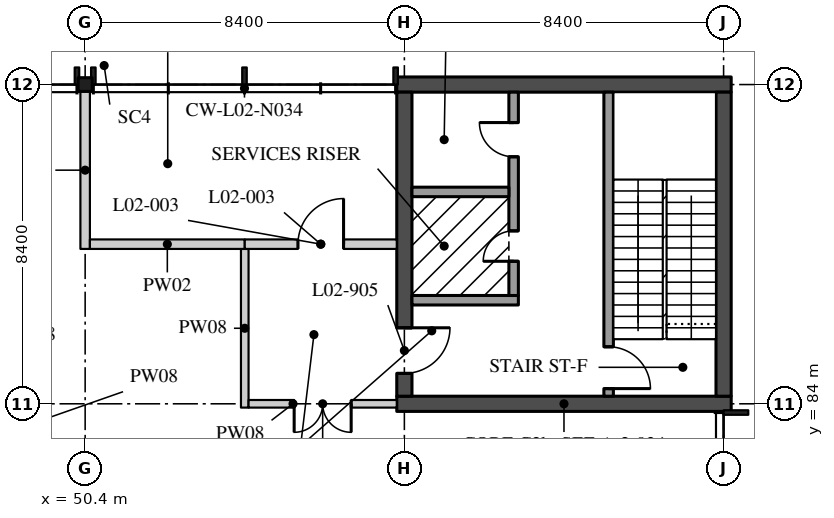
"""IFC4 building model, lengths in metres.
Left out: names, types, materials, properties, quantities, classifications, styles, units other than length and angle.
Written with IfcOpenShell. Run it as: python <this file> out.ifc"""

import sys

from ifc_helpers import new_model, si_unit, direction, frame, frame_2d, origin, origin_2d, place, context, subcontext, project, spatial, rectangle, i_section, extrude, element, fill, save


model = new_model("IFC4")
c1 = context("Model", 3, precision=1e-05, world=origin(), true_north=direction((0.0, 1.0)))
c2 = subcontext(c1, "Body", "Model", "MODEL_VIEW")
j1 = project(units=[si_unit("LENGTHUNIT", "METRE"), si_unit("PLANEANGLEUNIT", "RADIAN")], contexts=[c1])
p1 = place(None, origin())
s1 = spatial("IfcSite", under=j1, at=p1, CompositionType="ELEMENT")
p2 = place(p1, origin())
s2 = spatial("IfcBuilding", under=s1, at=p2, CompositionType="ELEMENT")
p3 = place(p2, frame((0.0, 0.0, 9.9)))
s3 = spatial("IfcBuildingStorey", under=s2, at=p3, CompositionType="ELEMENT", Elevation=9.9)
p4 = place(p3, frame((50.4, 92.4, 0.0), z_axis=(0.0, 0.0, 1.0), x_axis=(1.0, 0.0, 0.0)))
e1 = element("IfcColumn", 1, at=p4, inside=s3, PredefinedType="COLUMN", context=c2, shape_type="SweptSolid", body=[
    extrude(i_section(OverallWidth=0.371, OverallDepth=0.361, WebThickness=0.012, FlangeThickness=0.02, FilletRadius=0.015, at=origin_2d()), origin(), (0.0, 0.0, 1.0), 4.5),
])
for number, where, z_axis, x_axis in (
    (2, (58.6, 84.0, 0.0), (0.0, 0.0, 1.0), (1.0, 0.0, 0.0)),
    (3, (58.6, 92.4, 0.0), (0.0, 0.0, 1.0), (1.0, 0.0, 0.0)),
):
    element("IfcWall", number, at=place(p3, frame(where, z_axis=z_axis, x_axis=x_axis)), inside=s3, PredefinedType="SHEAR", context=c2, shape_type="SweptSolid", body=[
        extrude(rectangle(XDim=8.8, YDim=0.4, at=frame_2d((4.4, 0.0))), origin(), (0.0, 0.0, 1.0), 4.25),
    ])
p5 = place(p3, frame((58.8, 84.2, 0.0), z_axis=(0.0, 0.0, 1.0), x_axis=(0.0, 1.0, 0.0)))
e4 = element("IfcWall", 4, at=p5, inside=s3, PredefinedType="SHEAR", context=c2, shape_type="SweptSolid", body=[
    extrude(rectangle(XDim=8.0, YDim=0.4, at=frame_2d((4.0, 0.0))), origin(), (0.0, 0.0, 1.0), 4.25),
])
p6 = place(p5, frame((0.6, 0.0, 0.0)))
e5 = element("IfcOpeningElement", 5, at=p6, cuts=e4, PredefinedType="OPENING", context=c2, shape_type="SweptSolid", body=[
    extrude(rectangle(XDim=1.2, YDim=2.1, at=frame_2d((0.6, 1.05))), frame((0.0, 0.21, 0.0), z_axis=(0.0, -1.0, 0.0), x_axis=(1.0, 0.0, 0.0)), (0.0, 0.0, 1.0), 0.42),
])
p7 = place(p3, frame((67.2, 84.2, 0.0), z_axis=(0.0, 0.0, 1.0), x_axis=(0.0, 1.0, 0.0)))
e6 = element("IfcWall", 6, at=p7, inside=s3, PredefinedType="SHEAR", context=c2, shape_type="SweptSolid", body=[
    extrude(rectangle(XDim=8.0, YDim=0.4, at=frame_2d((4.0, 0.0))), origin(), (0.0, 0.0, 1.0), 4.25),
])
p8 = place(p3, frame((64.175, 84.2, 0.0), z_axis=(0.0, 0.0, 1.0), x_axis=(0.0, 1.0, 0.0)))
e7 = element("IfcWall", 7, at=p8, inside=s3, PredefinedType="SOLIDWALL", context=c2, shape_type="SweptSolid", body=[
    extrude(rectangle(XDim=8.0, YDim=0.25, at=frame_2d((4.0, 0.0))), origin(), (0.0, 0.0, 1.0), 4.25),
])
p9 = place(p8, frame((0.2, 0.0, 0.0)))
e8 = element("IfcOpeningElement", 8, at=p9, cuts=e7, PredefinedType="OPENING", context=c2, shape_type="SweptSolid", body=[
    extrude(rectangle(XDim=1.1, YDim=2.1, at=frame_2d((0.55, 1.05))), frame((0.0, 0.135, 0.0), z_axis=(0.0, -1.0, 0.0), x_axis=(1.0, 0.0, 0.0)), (0.0, 0.0, 1.0), 0.27),
])
p10 = place(p3, frame((61.8, 86.725, 0.0), z_axis=(0.0, 0.0, 1.0), x_axis=(-1.0, 0.0, 0.0)))
e9 = element("IfcWall", 9, at=p10, inside=s3, PredefinedType="SOLIDWALL", context=c2, shape_type="SweptSolid", body=[
    extrude(rectangle(XDim=2.8, YDim=0.25, at=frame_2d((1.4, 0.0))), origin(), (0.0, 0.0, 1.0), 4.25),
])
p11 = place(p3, frame((61.675, 86.85, 0.0), z_axis=(0.0, 0.0, 1.0), x_axis=(0.0, 1.0, 0.0)))
e10 = element("IfcWall", 10, at=p11, inside=s3, PredefinedType="SOLIDWALL", context=c2, shape_type="SweptSolid", body=[
    extrude(rectangle(XDim=5.35, YDim=0.25, at=frame_2d((2.675, 0.0))), origin(), (0.0, 0.0, 1.0), 4.25),
])
p12 = place(p11, frame((3.65, 0.0, 0.0)))
e11 = element("IfcOpeningElement", 11, at=p12, cuts=e10, PredefinedType="OPENING", context=c2, shape_type="SweptSolid", body=[
    extrude(rectangle(XDim=0.9, YDim=2.1, at=frame_2d((0.45, 1.05))), frame((0.0, 0.135, 0.0), z_axis=(0.0, -1.0, 0.0), x_axis=(1.0, 0.0, 0.0)), (0.0, 0.0, 1.0), 0.27),
])
p13 = place(p11, frame((0.9, 0.0, 0.0)))
e12 = element("IfcOpeningElement", 12, at=p13, cuts=e10, PredefinedType="OPENING", context=c2, shape_type="SweptSolid", body=[
    extrude(rectangle(XDim=0.8, YDim=2.1, at=frame_2d((0.4, 1.05))), frame((0.0, 0.135, 0.0), z_axis=(0.0, -1.0, 0.0), x_axis=(1.0, 0.0, 0.0)), (0.0, 0.0, 1.0), 0.27),
])
p14 = place(p3, frame((61.55, 89.575, 0.0), z_axis=(0.0, 0.0, 1.0), x_axis=(-1.0, 0.0, 0.0)))
e13 = element("IfcWall", 13, at=p14, inside=s3, PredefinedType="SOLIDWALL", context=c2, shape_type="SweptSolid", body=[
    extrude(rectangle(XDim=2.55, YDim=0.25, at=frame_2d((1.275, 0.0))), origin(), (0.0, 0.0, 1.0), 4.25),
])
p15 = place(p3, frame((54.6, 83.9, 0.0), z_axis=(0.0, 0.0, 1.0), x_axis=(0.0, 1.0, 0.0)))
e14 = element("IfcWall", 14, at=p15, inside=s3, PredefinedType="PARTITIONING", context=c2, shape_type="SweptSolid", body=[
    extrude(rectangle(XDim=4.175, YDim=0.2, at=frame_2d((2.087, 0.0))), origin(), (0.0, 0.0, 1.0), 4.25),
])
p16 = place(p3, frame((54.7, 84.0, 0.0), z_axis=(0.0, 0.0, 1.0), x_axis=(1.0, 0.0, 0.0)))
e15 = element("IfcWall", 15, at=p16, inside=s3, PredefinedType="PARTITIONING", context=c2, shape_type="SweptSolid", body=[
    extrude(rectangle(XDim=3.9, YDim=0.2, at=frame_2d((1.95, 0.0))), origin(), (0.0, 0.0, 1.0), 4.25),
])
p17 = place(p16, frame((1.2, 0.0, 0.0)))
e16 = element("IfcOpeningElement", 16, at=p17, cuts=e15, PredefinedType="OPENING", context=c2, shape_type="SweptSolid", body=[
    extrude(rectangle(XDim=1.5, YDim=2.1, at=frame_2d((0.75, 1.05))), frame((0.0, 0.11, 0.0), z_axis=(0.0, -1.0, 0.0), x_axis=(1.0, 0.0, 0.0)), (0.0, 0.0, 1.0), 0.22),
])
p18 = place(p3, frame((50.4, 88.075, 0.0), z_axis=(0.0, 0.0, 1.0), x_axis=(0.0, 1.0, 0.0)))
e17 = element("IfcWall", 17, at=p18, inside=s3, PredefinedType="PARTITIONING", context=c2, shape_type="SweptSolid", body=[
    extrude(rectangle(XDim=4.145, YDim=0.25, at=frame_2d((2.073, 0.0))), origin(), (0.0, 0.0, 1.0), 4.25),
])
p19 = place(p3, frame((50.525, 88.2, 0.0), z_axis=(0.0, 0.0, 1.0), x_axis=(1.0, 0.0, 0.0)))
e18 = element("IfcWall", 18, at=p19, inside=s3, PredefinedType="PARTITIONING", context=c2, shape_type="SweptSolid", body=[
    extrude(rectangle(XDim=4.075, YDim=0.25, at=frame_2d((2.038, 0.0))), origin(), (0.0, 0.0, 1.0), 4.25),
])
p20 = place(p3, frame((54.6, 88.2, 0.0), z_axis=(0.0, 0.0, 1.0), x_axis=(1.0, 0.0, 0.0)))
e19 = element("IfcWall", 19, at=p20, inside=s3, PredefinedType="PARTITIONING", context=c2, shape_type="SweptSolid", body=[
    extrude(rectangle(XDim=4.0, YDim=0.25, at=frame_2d((2.0, 0.0))), origin(), (0.0, 0.0, 1.0), 4.25),
])
p21 = place(p20, frame((1.4, 0.0, 0.0)))
e20 = element("IfcOpeningElement", 20, at=p21, cuts=e19, PredefinedType="OPENING", context=c2, shape_type="SweptSolid", body=[
    extrude(rectangle(XDim=1.2, YDim=2.4, at=frame_2d((0.6, 1.2))), frame((0.0, 0.135, 0.0), z_axis=(0.0, -1.0, 0.0), x_axis=(1.0, 0.0, 0.0)), (0.0, 0.0, 1.0), 0.27),
])
p22 = place(p12, origin())
e21 = element("IfcDoor", 21, at=p22, inside=s3, OperationType="SINGLE_SWING_LEFT", PredefinedType="DOOR", context=c2, shape_type="SweptSolid", body=[
    extrude(rectangle(XDim=0.9, YDim=2.1, at=frame_2d((0.45, 1.05))), frame((0.0, 0.035, 0.0), z_axis=(0.0, -1.0, 0.0), x_axis=(1.0, 0.0, 0.0)), (0.0, 0.0, 1.0), 0.07),
])
fill(e11, e21)
p23 = place(p6, frame((1.2, 0.0, 0.0), z_axis=(0.0, 0.0, 1.0), x_axis=(-1.0, 0.0, 0.0)))
e22 = element("IfcDoor", 22, at=p23, inside=s3, OperationType="SINGLE_SWING_RIGHT", PredefinedType="DOOR", context=c2, shape_type="SweptSolid", body=[
    extrude(rectangle(XDim=1.2, YDim=2.1, at=frame_2d((0.6, 1.05))), frame((0.0, 0.035, 0.0), z_axis=(0.0, -1.0, 0.0), x_axis=(1.0, 0.0, 0.0)), (0.0, 0.0, 1.0), 0.07),
])
fill(e5, e22)
p24 = place(p13, origin())
e23 = element("IfcDoor", 23, at=p24, inside=s3, OperationType="SINGLE_SWING_RIGHT", PredefinedType="DOOR", context=c2, shape_type="SweptSolid", body=[
    extrude(rectangle(XDim=0.8, YDim=2.1, at=frame_2d((0.4, 1.05))), frame((0.0, 0.035, 0.0), z_axis=(0.0, -1.0, 0.0), x_axis=(1.0, 0.0, 0.0)), (0.0, 0.0, 1.0), 0.07),
])
fill(e12, e23)
p25 = place(p9, frame((1.1, 0.0, 0.0), z_axis=(0.0, 0.0, 1.0), x_axis=(-1.0, 0.0, 0.0)))
e24 = element("IfcDoor", 24, at=p25, inside=s3, OperationType="SINGLE_SWING_LEFT", PredefinedType="DOOR", context=c2, shape_type="SweptSolid", body=[
    extrude(rectangle(XDim=1.1, YDim=2.1, at=frame_2d((0.55, 1.05))), frame((0.0, 0.035, 0.0), z_axis=(0.0, -1.0, 0.0), x_axis=(1.0, 0.0, 0.0)), (0.0, 0.0, 1.0), 0.07),
])
fill(e8, e24)
p26 = place(p17, frame((1.5, 0.0, 0.0), z_axis=(0.0, 0.0, 1.0), x_axis=(-1.0, 0.0, 0.0)))
e25 = element("IfcDoor", 25, at=p26, inside=s3, OperationType="DOUBLE_DOOR_SINGLE_SWING", PredefinedType="DOOR", context=c2, shape_type="SweptSolid", body=[
    extrude(rectangle(XDim=1.5, YDim=2.1, at=frame_2d((0.75, 1.05))), frame((0.0, 0.03, 0.0), z_axis=(0.0, -1.0, 0.0), x_axis=(1.0, 0.0, 0.0)), (0.0, 0.0, 1.0), 0.06),
])
fill(e16, e25)
p27 = place(p21, origin())
e26 = element("IfcDoor", 26, at=p27, inside=s3, OperationType="SINGLE_SWING_LEFT", PredefinedType="DOOR", context=c2, shape_type="SweptSolid", body=[
    extrude(rectangle(XDim=1.2, YDim=2.4, at=frame_2d((0.6, 1.2))), frame((0.0, 0.05, 0.0), z_axis=(0.0, -1.0, 0.0), x_axis=(1.0, 0.0, 0.0)), (0.0, 0.0, 1.0), 0.1),
])
fill(e20, e26)
save(model, sys.argv[1])
